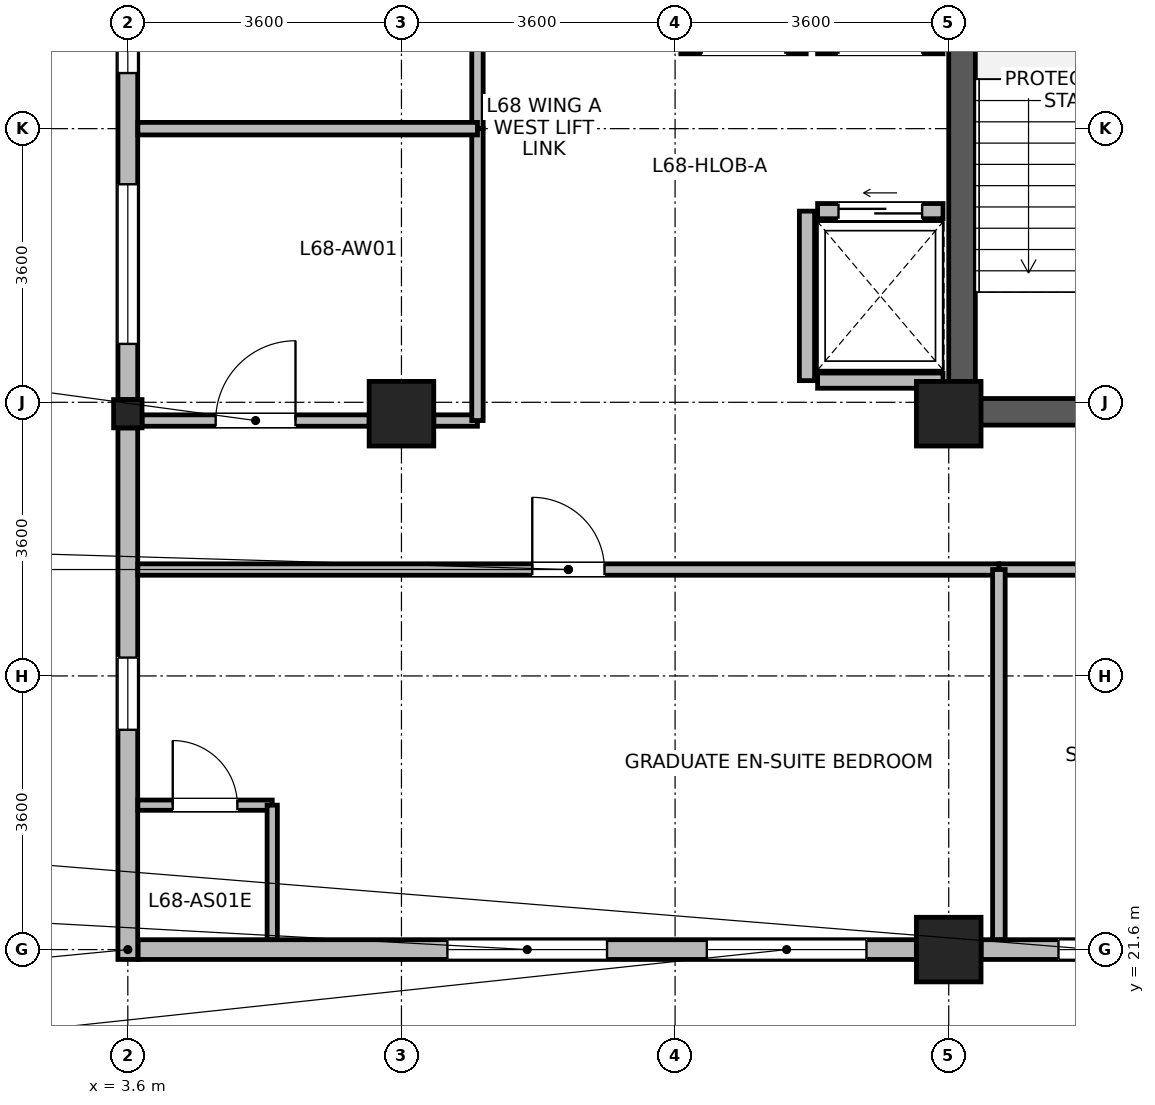
"""IFC4 building model, lengths in metres.
Left out: names, types, materials, properties, quantities, classifications, styles, units other than length and angle.
Written with IfcOpenShell. Run it as: python <this file> out.ifc"""

import sys

from ifc_helpers import new_model, si_unit, direction, frame, frame_2d, origin, origin_2d, place, context, subcontext, project, spatial, rectangle, i_section, extrude, source, transform, mapped, element, fill, save


model = new_model("IFC4")
c1 = context("Model", 3, precision=1e-05, world=origin(), true_north=direction((0.0, 1.0)))
c2 = subcontext(c1, "Body", "Model", "MODEL_VIEW")
j1 = project(units=[si_unit("LENGTHUNIT", "METRE"), si_unit("PLANEANGLEUNIT", "RADIAN")], contexts=[c1])
p1 = place(None, origin())
s1 = spatial("IfcSite", under=j1, at=p1, CompositionType="ELEMENT")
p2 = place(p1, origin())
s2 = spatial("IfcBuilding", under=s1, at=p2, CompositionType="ELEMENT")
p3 = place(p2, frame((0.0, 0.0, 264.7)))
s3 = spatial("IfcBuildingStorey", under=s2, at=p3, CompositionType="ELEMENT", Elevation=264.7)
p4 = place(p3, frame((14.575, 28.5, 0.0), z_axis=(0.0, 0.0, 1.0), x_axis=(0.0, 1.0, 0.0)))
e1 = element("IfcWall", 1, at=p4, inside=s3, PredefinedType="SHEAR", context=c2, shape_type="SweptSolid", body=[
    extrude(rectangle(XDim=7.7, YDim=0.35, at=frame_2d((3.85, 0.0))), origin(), (0.0, 0.0, 1.0), 3.475),
])
p5 = place(p3, frame((14.75, 28.675, 0.0), z_axis=(0.0, 0.0, 1.0), x_axis=(1.0, 0.0, 0.0)))
e2 = element("IfcWall", 2, at=p5, inside=s3, PredefinedType="SHEAR", context=c2, shape_type="SweptSolid", body=[
    extrude(rectangle(XDim=3.2, YDim=0.35, at=frame_2d((1.6, 0.0))), origin(), (0.0, 0.0, 1.0), 3.475),
])
m1 = source(origin(), c2, "Body", "SweptSolid", [
    extrude(rectangle(XDim=0.85, YDim=0.85, at=origin_2d()), origin(), (0.0, 0.0, 1.0), 3.7),
])
for number, where, z_axis, x_axis in (
    (3, (7.2, 28.65, 0.0), (0.0, 0.0, 1.0), (1.0, 0.0, 0.0)),
    (4, (14.4, 21.6, 0.0), (0.0, 0.0, 1.0), (1.0, 0.0, 0.0)),
    (5, (14.4, 28.65, 0.0), (0.0, 0.0, 1.0), (1.0, 0.0, 0.0)),
):
    element("IfcColumn", number, at=place(p3, frame(where, z_axis=z_axis, x_axis=x_axis)), inside=s3, PredefinedType="COLUMN", context=c2, shape_type="MappedRepresentation", body=[
        mapped(m1, transform((0.0, 0.0, 0.0), x_axis=(1.0, 0.0, 0.0), y_axis=(0.0, 1.0, 0.0), z_axis=(0.0, 0.0, 1.0), scale=1.0)),
    ])
m2 = source(origin(), c2, "Body", "SweptSolid", [
    extrude(i_section(OverallWidth=0.374, OverallDepth=0.372, WebThickness=0.015, FlangeThickness=0.026, FilletRadius=0.015, at=origin_2d()), origin(), (0.0, 0.0, 1.0), 3.7),
])
p6 = place(p3, frame((3.6, 28.65, 0.0), z_axis=(0.0, 0.0, 1.0), x_axis=(1.0, 0.0, 0.0)))
e6 = element("IfcColumn", 6, at=p6, inside=s3, PredefinedType="COLUMN", context=c2, shape_type="MappedRepresentation", body=[
    mapped(m2, transform((0.0, 0.0, 0.0), x_axis=(1.0, 0.0, 0.0), y_axis=(0.0, 1.0, 0.0), z_axis=(0.0, 0.0, 1.0), scale=1.0)),
])
p7 = place(p3, frame((13.974, 21.6, 0.0), z_axis=(0.0, 0.0, 1.0), x_axis=(-1.0, 0.0, 0.0)))
e7 = element("IfcWall", 7, at=p7, inside=s3, PredefinedType="STANDARD", context=c2, shape_type="SweptSolid", body=[
    extrude(rectangle(XDim=10.239, YDim=0.26, at=frame_2d((5.12, 0.0))), origin(), (0.0, 0.0, 1.0), 3.455),
])
p8 = place(p7, frame((0.656, 0.0, 0.85)))
e8 = element("IfcOpeningElement", 8, at=p8, cuts=e7, PredefinedType="OPENING", context=c2, shape_type="SweptSolid", body=[
    extrude(rectangle(XDim=2.1, YDim=1.95, at=frame_2d((1.05, 0.975))), frame((0.0, 0.14, 0.0), z_axis=(0.0, -1.0, 0.0), x_axis=(1.0, 0.0, 0.0)), (0.0, 0.0, 1.0), 0.28),
])
p9 = place(p7, frame((4.07, 0.0, 0.85)))
e9 = element("IfcOpeningElement", 9, at=p9, cuts=e7, PredefinedType="OPENING", context=c2, shape_type="SweptSolid", body=[
    extrude(rectangle(XDim=2.1, YDim=1.95, at=frame_2d((1.05, 0.975))), frame((0.0, 0.14, 0.0), z_axis=(0.0, -1.0, 0.0), x_axis=(1.0, 0.0, 0.0)), (0.0, 0.0, 1.0), 0.28),
])
p10 = place(p3, frame((17.812, 21.6, 0.0), z_axis=(0.0, 0.0, 1.0), x_axis=(-1.0, 0.0, 0.0)))
e10 = element("IfcWall", 10, at=p10, inside=s3, PredefinedType="STANDARD", context=c2, shape_type="SweptSolid", body=[
    extrude(rectangle(XDim=2.986, YDim=0.26, at=frame_2d((1.493, 0.0))), origin(), (0.0, 0.0, 1.0), 3.055),
])
p11 = place(p10, frame((1.018, 0.0, 0.85)))
e11 = element("IfcOpeningElement", 11, at=p11, cuts=e10, PredefinedType="OPENING", context=c2, shape_type="SweptSolid", body=[
    extrude(rectangle(XDim=0.95, YDim=1.75, at=frame_2d((0.475, 0.875))), frame((0.0, 0.14, 0.0), z_axis=(0.0, -1.0, 0.0), x_axis=(1.0, 0.0, 0.0)), (0.0, 0.0, 1.0), 0.28),
])
p12 = place(p3, frame((3.6, 28.837, 0.0), z_axis=(0.0, 0.0, 1.0), x_axis=(0.0, 1.0, 0.0)))
e12 = element("IfcWall", 12, at=p12, inside=s3, PredefinedType="STANDARD", context=c2, shape_type="SweptSolid", body=[
    extrude(rectangle(XDim=7.126, YDim=0.26, at=frame_2d((3.563, 0.0))), origin(), (0.0, 0.0, 1.0), 3.055),
])
p13 = place(p12, frame((0.731, 0.0, 0.85)))
e13 = element("IfcOpeningElement", 13, at=p13, cuts=e12, PredefinedType="OPENING", context=c2, shape_type="SweptSolid", body=[
    extrude(rectangle(XDim=2.1, YDim=1.95, at=frame_2d((1.05, 0.975))), frame((0.0, 0.14, 0.0), z_axis=(0.0, -1.0, 0.0), x_axis=(1.0, 0.0, 0.0)), (0.0, 0.0, 1.0), 0.28),
])
p14 = place(p12, frame((4.294, 0.0, 0.85)))
e14 = element("IfcOpeningElement", 14, at=p14, cuts=e12, PredefinedType="OPENING", context=c2, shape_type="SweptSolid", body=[
    extrude(rectangle(XDim=2.1, YDim=1.95, at=frame_2d((1.05, 0.975))), frame((0.0, 0.14, 0.0), z_axis=(0.0, -1.0, 0.0), x_axis=(1.0, 0.0, 0.0)), (0.0, 0.0, 1.0), 0.28),
])
p15 = place(p3, frame((3.6, 21.47, 0.0), z_axis=(0.0, 0.0, 1.0), x_axis=(0.0, 1.0, 0.0)))
e15 = element("IfcWall", 15, at=p15, inside=s3, PredefinedType="STANDARD", context=c2, shape_type="SweptSolid", body=[
    extrude(rectangle(XDim=6.993, YDim=0.26, at=frame_2d((3.497, 0.0))), origin(), (0.0, 0.0, 1.0), 3.455),
])
p16 = place(p15, frame((3.021, 0.0, 0.85)))
e16 = element("IfcOpeningElement", 16, at=p16, cuts=e15, PredefinedType="OPENING", context=c2, shape_type="SweptSolid", body=[
    extrude(rectangle(XDim=0.95, YDim=1.75, at=frame_2d((0.475, 0.875))), frame((0.0, 0.14, 0.0), z_axis=(0.0, -1.0, 0.0), x_axis=(1.0, 0.0, 0.0)), (0.0, 0.0, 1.0), 0.28),
])
p17 = place(p3, frame((12.675, 33.485, 0.0), z_axis=(0.0, 0.0, 1.0), x_axis=(1.0, 0.0, 0.0)))
e17 = element("IfcWall", 17, at=p17, inside=s3, PredefinedType="PARTITIONING", context=c2, shape_type="SweptSolid", body=[
    extrude(rectangle(XDim=1.65, YDim=0.2, at=frame_2d((0.825, 0.0))), origin(), (0.0, 0.0, 1.0), 3.455),
])
p18 = place(p17, frame((0.275, 0.0, 0.0)))
e18 = element("IfcOpeningElement", 18, at=p18, cuts=e17, PredefinedType="OPENING", context=c2, shape_type="SweptSolid", body=[
    extrude(rectangle(XDim=1.1, YDim=2.12, at=frame_2d((0.55, 1.06))), frame((0.0, 0.11, 0.0), z_axis=(0.0, -1.0, 0.0), x_axis=(1.0, 0.0, 0.0)), (0.0, 0.0, 1.0), 0.22),
])
p19 = place(p3, frame((12.675, 29.085, 0.0), z_axis=(0.0, 0.0, 1.0), x_axis=(1.0, 0.0, 0.0)))
e19 = element("IfcWall", 19, at=p19, inside=s3, PredefinedType="PARTITIONING", context=c2, shape_type="SweptSolid", body=[
    extrude(rectangle(XDim=1.65, YDim=0.2, at=frame_2d((0.825, 0.0))), origin(), (0.0, 0.0, 1.0), 3.455),
])
p20 = place(p3, frame((12.675, 31.315, 0.0), z_axis=(0.0, 0.0, 1.0), x_axis=(1.0, 0.0, 0.0)))
e20 = element("IfcWall", 20, at=p20, inside=s3, PredefinedType="PARTITIONING", context=c2, shape_type="SweptSolid", body=[
    extrude(rectangle(XDim=1.65, YDim=0.2, at=frame_2d((0.825, 0.0))), origin(), (0.0, 0.0, 1.0), 3.455),
])
p21 = place(p20, frame((0.275, 0.0, 0.0)))
e21 = element("IfcOpeningElement", 21, at=p21, cuts=e20, PredefinedType="OPENING", context=c2, shape_type="SweptSolid", body=[
    extrude(rectangle(XDim=1.1, YDim=2.12, at=frame_2d((0.55, 1.06))), frame((0.0, 0.11, 0.0), z_axis=(0.0, -1.0, 0.0), x_axis=(1.0, 0.0, 0.0)), (0.0, 0.0, 1.0), 0.22),
])
p22 = place(p3, frame((12.535, 29.085, 0.0), z_axis=(0.0, 0.0, 1.0), x_axis=(0.0, 1.0, 0.0)))
e22 = element("IfcWall", 22, at=p22, inside=s3, PredefinedType="PARTITIONING", context=c2, shape_type="SweptSolid", body=[
    extrude(rectangle(XDim=2.23, YDim=0.2, at=frame_2d((1.115, 0.0))), origin(), (0.0, 0.0, 1.0), 3.455),
])
p23 = place(p3, frame((10.875, 33.485, 0.0), z_axis=(0.0, 0.0, 1.0), x_axis=(1.0, 0.0, 0.0)))
e23 = element("IfcWall", 23, at=p23, inside=s3, PredefinedType="PARTITIONING", context=c2, shape_type="SweptSolid", body=[
    extrude(rectangle(XDim=1.65, YDim=0.2, at=frame_2d((0.825, 0.0))), origin(), (0.0, 0.0, 1.0), 3.455),
])
p24 = place(p23, frame((0.275, 0.0, 0.0)))
e24 = element("IfcOpeningElement", 24, at=p24, cuts=e23, PredefinedType="OPENING", context=c2, shape_type="SweptSolid", body=[
    extrude(rectangle(XDim=1.1, YDim=2.12, at=frame_2d((0.55, 1.06))), frame((0.0, 0.11, 0.0), z_axis=(0.0, -1.0, 0.0), x_axis=(1.0, 0.0, 0.0)), (0.0, 0.0, 1.0), 0.22),
])
p25 = place(p3, frame((3.732, 23.5, 0.0), z_axis=(0.0, 0.0, 1.0), x_axis=(1.0, 0.0, 0.0)))
e25 = element("IfcWall", 25, at=p25, inside=s3, PredefinedType="PARTITIONING", context=c2, shape_type="SweptSolid", body=[
    extrude(rectangle(XDim=1.768, YDim=0.135, at=frame_2d((0.884, 0.0))), origin(), (0.0, 0.0, 1.0), 3.455),
])
p26 = place(p25, frame((0.459, 0.0, 0.0)))
e26 = element("IfcOpeningElement", 26, at=p26, cuts=e25, PredefinedType="OPENING", context=c2, shape_type="SweptSolid", body=[
    extrude(rectangle(XDim=0.85, YDim=2.04, at=frame_2d((0.425, 1.02))), frame((0.0, 0.078, 0.0), z_axis=(0.0, -1.0, 0.0), x_axis=(1.0, 0.0, 0.0)), (0.0, 0.0, 1.0), 0.155),
])
p27 = place(p3, frame((5.5, 21.732, 0.0), z_axis=(0.0, 0.0, 1.0), x_axis=(0.0, 1.0, 0.0)))
e27 = element("IfcWall", 27, at=p27, inside=s3, PredefinedType="PARTITIONING", context=c2, shape_type="SweptSolid", body=[
    extrude(rectangle(XDim=1.768, YDim=0.135, at=frame_2d((0.884, 0.0))), origin(), (0.0, 0.0, 1.0), 3.455),
])
p28 = place(p3, frame((15.06, 26.6, 0.0), z_axis=(0.0, 0.0, 1.0), x_axis=(1.0, 0.0, 0.0)))
e28 = element("IfcWall", 28, at=p28, inside=s3, PredefinedType="PARTITIONING", context=c2, shape_type="SweptSolid", body=[
    extrude(rectangle(XDim=12.1, YDim=0.15, at=frame_2d((6.05, 0.0))), origin(), (0.0, 0.0, 1.0), 3.455),
])
p29 = place(p28, frame((5.575, 0.0, 0.0)))
e29 = element("IfcOpeningElement", 29, at=p29, cuts=e28, PredefinedType="OPENING", context=c2, shape_type="SweptSolid", body=[
    extrude(rectangle(XDim=0.95, YDim=2.1, at=frame_2d((0.475, 1.05))), frame((0.0, 0.085, 0.0), z_axis=(0.0, -1.0, 0.0), x_axis=(1.0, 0.0, 0.0)), (0.0, 0.0, 1.0), 0.17),
])
p30 = place(p3, frame((3.732, 26.6, 0.0), z_axis=(0.0, 0.0, 1.0), x_axis=(1.0, 0.0, 0.0)))
e30 = element("IfcWall", 30, at=p30, inside=s3, PredefinedType="PARTITIONING", context=c2, shape_type="SweptSolid", body=[
    extrude(rectangle(XDim=11.328, YDim=0.15, at=frame_2d((5.664, 0.0))), origin(), (0.0, 0.0, 1.0), 3.455),
])
p31 = place(p30, frame((5.189, 0.0, 0.0)))
e31 = element("IfcOpeningElement", 31, at=p31, cuts=e30, PredefinedType="OPENING", context=c2, shape_type="SweptSolid", body=[
    extrude(rectangle(XDim=0.95, YDim=2.1, at=frame_2d((0.475, 1.05))), frame((0.0, 0.085, 0.0), z_axis=(0.0, -1.0, 0.0), x_axis=(1.0, 0.0, 0.0)), (0.0, 0.0, 1.0), 0.17),
])
p32 = place(p3, frame((3.787, 28.56, 0.0), z_axis=(0.0, 0.0, 1.0), x_axis=(1.0, 0.0, 0.0)))
e32 = element("IfcWall", 32, at=p32, inside=s3, PredefinedType="PARTITIONING", context=c2, shape_type="SweptSolid", body=[
    extrude(rectangle(XDim=2.988, YDim=0.15, at=frame_2d((1.494, 0.0))), origin(), (0.0, 0.0, 1.0), 2.905),
])
p33 = place(p32, frame((0.969, 0.0, 0.0)))
e33 = element("IfcOpeningElement", 33, at=p33, cuts=e32, PredefinedType="OPENING", context=c2, shape_type="SweptSolid", body=[
    extrude(rectangle(XDim=1.05, YDim=2.12, at=frame_2d((0.525, 1.06))), frame((0.0, 0.085, 0.0), z_axis=(0.0, -1.0, 0.0), x_axis=(1.0, 0.0, 0.0)), (0.0, 0.0, 1.0), 0.17),
])
p34 = place(p3, frame((7.625, 28.56, 0.0), z_axis=(0.0, 0.0, 1.0), x_axis=(1.0, 0.0, 0.0)))
e34 = element("IfcWall", 34, at=p34, inside=s3, PredefinedType="PARTITIONING", context=c2, shape_type="SweptSolid", body=[
    extrude(rectangle(XDim=0.575, YDim=0.15, at=frame_2d((0.288, 0.0))), origin(), (0.0, 0.0, 1.0), 2.905),
])
p35 = place(p3, frame((8.2, 32.4, 0.0), z_axis=(0.0, 0.0, 1.0), x_axis=(0.0, 1.0, 0.0)))
e35 = element("IfcWall", 35, at=p35, inside=s3, PredefinedType="PARTITIONING", context=c2, shape_type="SweptSolid", body=[
    extrude(rectangle(XDim=3.84, YDim=0.15, at=frame_2d((1.92, 0.0))), origin(), (0.0, 0.0, 1.0), 3.455),
])
p36 = place(p3, frame((8.2, 28.56, 0.0), z_axis=(0.0, 0.0, 1.0), x_axis=(0.0, 1.0, 0.0)))
e36 = element("IfcWall", 36, at=p36, inside=s3, PredefinedType="PARTITIONING", context=c2, shape_type="SweptSolid", body=[
    extrude(rectangle(XDim=3.84, YDim=0.15, at=frame_2d((1.92, 0.0))), origin(), (0.0, 0.0, 1.0), 3.455),
])
p37 = place(p3, frame((15.06, 21.732, 0.0), z_axis=(0.0, 0.0, 1.0), x_axis=(0.0, 1.0, 0.0)))
e37 = element("IfcWall", 37, at=p37, inside=s3, PredefinedType="PARTITIONING", context=c2, shape_type="SweptSolid", body=[
    extrude(rectangle(XDim=4.868, YDim=0.165, at=frame_2d((2.434, 0.0))), origin(), (0.0, 0.0, 1.0), 3.455),
])
p38 = place(p3, frame((3.732, 32.4, 0.0), z_axis=(0.0, 0.0, 1.0), x_axis=(1.0, 0.0, 0.0)))
e38 = element("IfcWall", 38, at=p38, inside=s3, PredefinedType="PARTITIONING", context=c2, shape_type="SweptSolid", body=[
    extrude(rectangle(XDim=4.468, YDim=0.165, at=frame_2d((2.234, 0.0))), origin(), (0.0, 0.0, 1.0), 3.455),
])
p39 = place(p8, origin())
e39 = element("IfcWindow", 39, at=p39, inside=s3, PartitioningType="SINGLE_PANEL", PredefinedType="WINDOW", context=c2, shape_type="SweptSolid", body=[
    extrude(rectangle(XDim=2.1, YDim=1.95, at=frame_2d((1.05, 0.975))), frame((0.0, 0.03, 0.0), z_axis=(0.0, -1.0, 0.0), x_axis=(1.0, 0.0, 0.0)), (0.0, 0.0, 1.0), 0.06),
])
fill(e8, e39)
p40 = place(p9, origin())
e40 = element("IfcWindow", 40, at=p40, inside=s3, PartitioningType="SINGLE_PANEL", PredefinedType="WINDOW", context=c2, shape_type="SweptSolid", body=[
    extrude(rectangle(XDim=2.1, YDim=1.95, at=frame_2d((1.05, 0.975))), frame((0.0, 0.03, 0.0), z_axis=(0.0, -1.0, 0.0), x_axis=(1.0, 0.0, 0.0)), (0.0, 0.0, 1.0), 0.06),
])
fill(e9, e40)
p41 = place(p11, origin())
e41 = element("IfcWindow", 41, at=p41, inside=s3, PartitioningType="SINGLE_PANEL", PredefinedType="WINDOW", context=c2, shape_type="SweptSolid", body=[
    extrude(rectangle(XDim=0.95, YDim=1.75, at=frame_2d((0.475, 0.875))), frame((0.0, 0.03, 0.0), z_axis=(0.0, -1.0, 0.0), x_axis=(1.0, 0.0, 0.0)), (0.0, 0.0, 1.0), 0.06),
])
fill(e11, e41)
p42 = place(p13, origin())
e42 = element("IfcWindow", 42, at=p42, inside=s3, PartitioningType="SINGLE_PANEL", PredefinedType="WINDOW", context=c2, shape_type="SweptSolid", body=[
    extrude(rectangle(XDim=2.1, YDim=1.95, at=frame_2d((1.05, 0.975))), frame((0.0, 0.03, 0.0), z_axis=(0.0, -1.0, 0.0), x_axis=(1.0, 0.0, 0.0)), (0.0, 0.0, 1.0), 0.06),
])
fill(e13, e42)
p43 = place(p14, origin())
e43 = element("IfcWindow", 43, at=p43, inside=s3, PartitioningType="SINGLE_PANEL", PredefinedType="WINDOW", context=c2, shape_type="SweptSolid", body=[
    extrude(rectangle(XDim=2.1, YDim=1.95, at=frame_2d((1.05, 0.975))), frame((0.0, 0.03, 0.0), z_axis=(0.0, -1.0, 0.0), x_axis=(1.0, 0.0, 0.0)), (0.0, 0.0, 1.0), 0.06),
])
fill(e14, e43)
p44 = place(p16, origin())
e44 = element("IfcWindow", 44, at=p44, inside=s3, PartitioningType="SINGLE_PANEL", PredefinedType="WINDOW", context=c2, shape_type="SweptSolid", body=[
    extrude(rectangle(XDim=0.95, YDim=1.75, at=frame_2d((0.475, 0.875))), frame((0.0, 0.03, 0.0), z_axis=(0.0, -1.0, 0.0), x_axis=(1.0, 0.0, 0.0)), (0.0, 0.0, 1.0), 0.06),
])
fill(e16, e44)
p45 = place(p21, origin())
e45 = element("IfcDoor", 45, at=p45, inside=s3, OperationType="SLIDING_TO_LEFT", PredefinedType="DOOR", context=c2, shape_type="SweptSolid", body=[
    extrude(rectangle(XDim=1.1, YDim=2.12, at=frame_2d((0.55, 1.06))), frame((0.0, 0.025, 0.0), z_axis=(0.0, -1.0, 0.0), x_axis=(1.0, 0.0, 0.0)), (0.0, 0.0, 1.0), 0.05),
])
fill(e21, e45)
p46 = place(p26, origin())
e46 = element("IfcDoor", 46, at=p46, inside=s3, OperationType="SINGLE_SWING_LEFT", PredefinedType="DOOR", context=c2, shape_type="SweptSolid", body=[
    extrude(rectangle(XDim=0.85, YDim=2.04, at=frame_2d((0.425, 1.02))), frame((0.0, 0.025, 0.0), z_axis=(0.0, -1.0, 0.0), x_axis=(1.0, 0.0, 0.0)), (0.0, 0.0, 1.0), 0.05),
])
fill(e26, e46)
p47 = place(p31, origin())
e47 = element("IfcDoor", 47, at=p47, inside=s3, OperationType="SINGLE_SWING_LEFT", PredefinedType="DOOR", context=c2, shape_type="SweptSolid", body=[
    extrude(rectangle(XDim=0.95, YDim=2.1, at=frame_2d((0.475, 1.05))), frame((0.0, 0.025, 0.0), z_axis=(0.0, -1.0, 0.0), x_axis=(1.0, 0.0, 0.0)), (0.0, 0.0, 1.0), 0.05),
])
fill(e31, e47)
p48 = place(p33, origin())
e48 = element("IfcDoor", 48, at=p48, inside=s3, OperationType="SINGLE_SWING_RIGHT", PredefinedType="DOOR", context=c2, shape_type="SweptSolid", body=[
    extrude(rectangle(XDim=1.05, YDim=2.12, at=frame_2d((0.525, 1.06))), frame((0.0, 0.025, 0.0), z_axis=(0.0, -1.0, 0.0), x_axis=(1.0, 0.0, 0.0)), (0.0, 0.0, 1.0), 0.05),
])
fill(e33, e48)
save(model, sys.argv[1])
